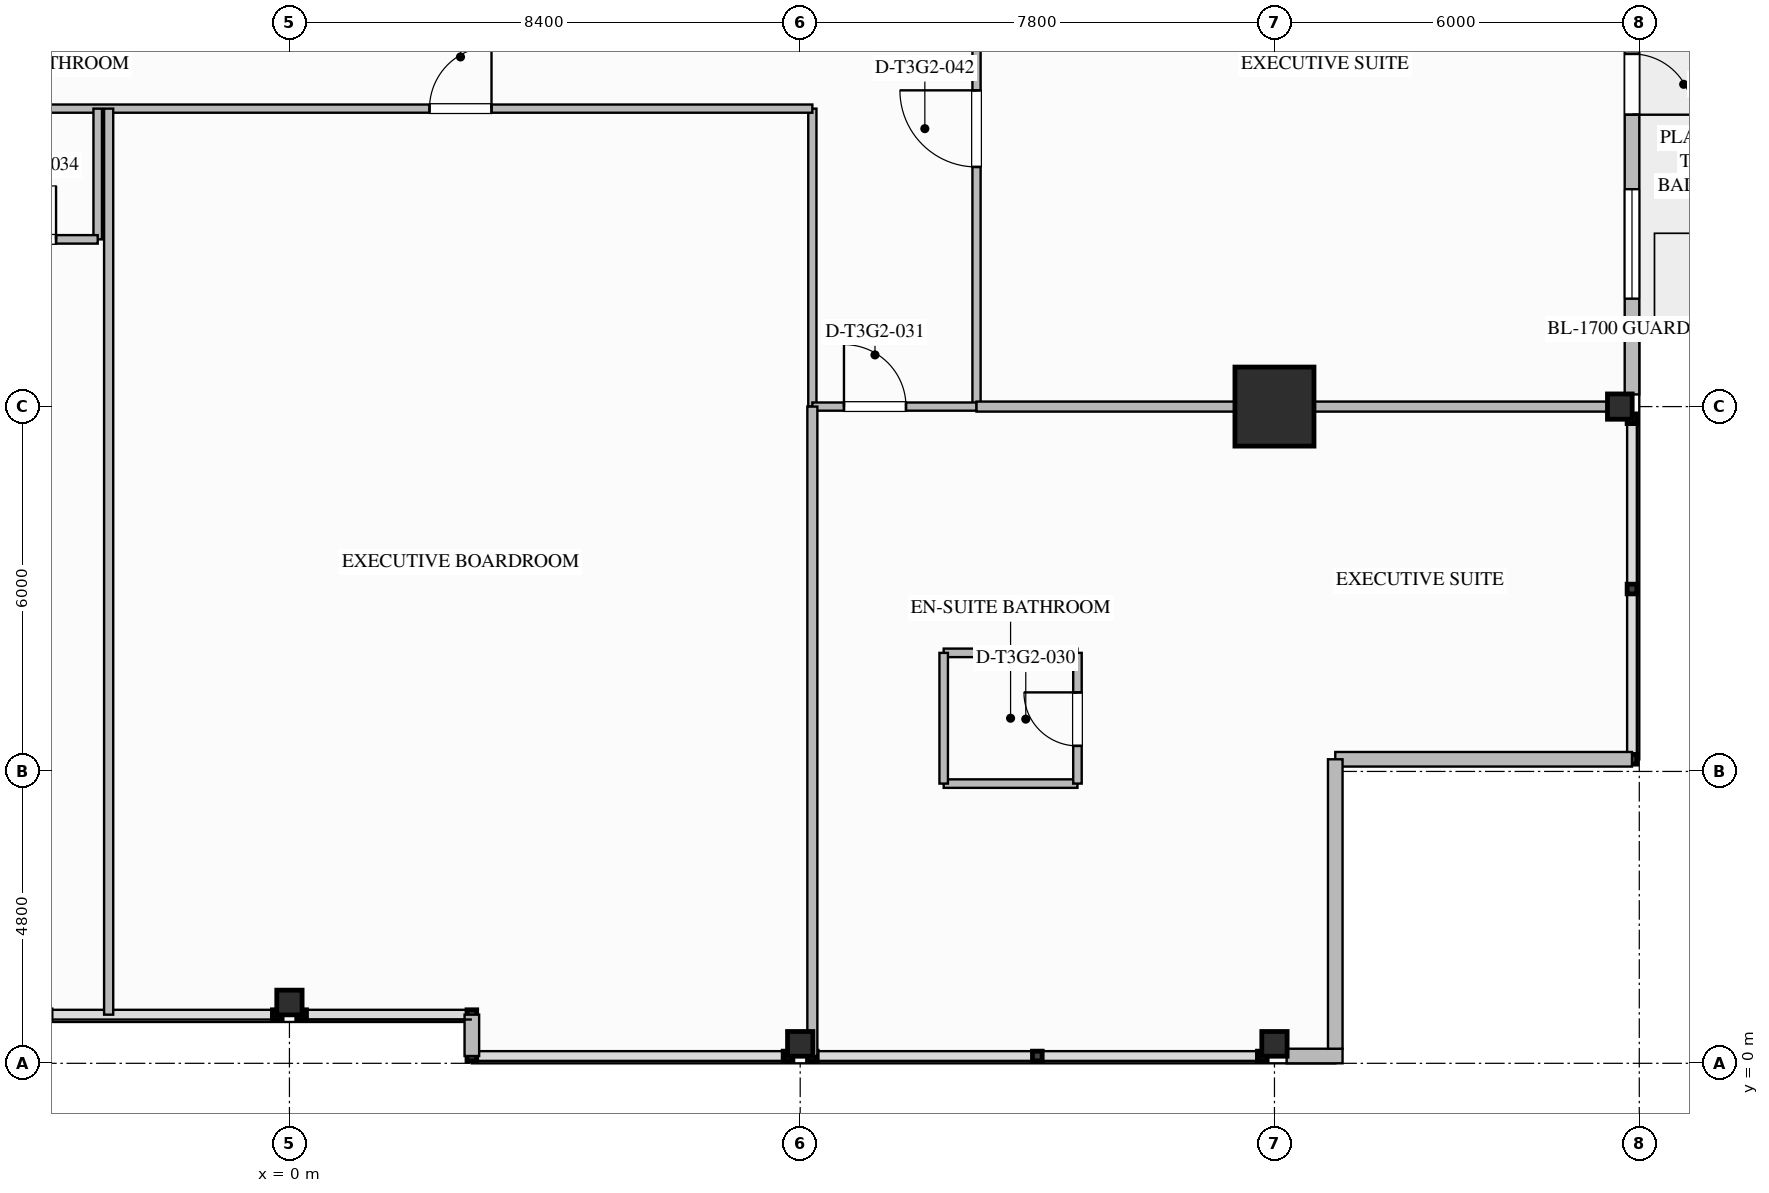
"""IFC4 building model, lengths in metres.
Left out: names, types, materials, properties, quantities, classifications, styles, units other than length and angle.
Written with IfcOpenShell. Run it as: python <this file> out.ifc"""

import sys

from ifc_helpers import new_model, si_unit, direction, frame, frame_2d, origin, origin_2d, place, context, subcontext, project, spatial, rectangle, i_section, extrude, element, fill, save


model = new_model("IFC4")
c1 = context("Model", 3, precision=1e-05, world=origin(), true_north=direction((0.0, 1.0)))
c2 = subcontext(c1, "Body", "Model", "MODEL_VIEW")
j1 = project(units=[si_unit("LENGTHUNIT", "METRE"), si_unit("PLANEANGLEUNIT", "RADIAN")], contexts=[c1])
p1 = place(None, origin())
s1 = spatial("IfcSite", under=j1, at=p1, CompositionType="ELEMENT")
p2 = place(p1, origin())
s2 = spatial("IfcBuilding", under=s1, at=p2, CompositionType="ELEMENT")
p3 = place(p2, frame((0.0, 0.0, 161.05)))
s3 = spatial("IfcBuildingStorey", under=s2, at=p3, CompositionType="ELEMENT", Elevation=161.05)
p4 = place(p3, frame((16.2, 10.8, 0.0), z_axis=(0.0, 0.0, 1.0), x_axis=(1.0, 0.0, 0.0)))
e1 = element("IfcColumn", 1, at=p4, inside=s3, PredefinedType="COLUMN", context=c2, shape_type="SweptSolid", body=[
    extrude(rectangle(XDim=1.3, YDim=1.3, at=origin_2d()), origin(), (0.0, 0.0, 1.0), 3.55),
])
for number, where, z_axis, x_axis in (
    (2, (21.88, 10.8, 0.0), (0.0, 0.0, 1.0), (1.0, 0.0, 0.0)),
    (3, (0.0, 1.0, 0.0), (0.0, 0.0, 1.0), (0.0, 1.0, 0.0)),
    (4, (8.4, 0.32, 0.0), (0.0, 0.0, 1.0), (0.0, 1.0, 0.0)),
    (5, (16.2, 0.32, 0.0), (0.0, 0.0, 1.0), (0.0, 1.0, 0.0)),
):
    element("IfcColumn", number, at=place(p3, frame(where, z_axis=z_axis, x_axis=x_axis)), inside=s3, PredefinedType="COLUMN", context=c2, shape_type="SweptSolid", body=[
        extrude(i_section(OverallWidth=0.406, OverallDepth=0.416, WebThickness=0.03, FlangeThickness=0.048, FilletRadius=0.028, at=origin_2d()), origin(), (0.0, 0.0, 1.0), 3.547),
    ])
p5 = place(p3, frame((22.08, 18.4, 0.0), z_axis=(0.0, 0.0, 1.0), x_axis=(0.0, -1.0, 0.0)))
e6 = element("IfcWall", 6, at=p5, inside=s3, PredefinedType="STANDARD", context=c2, shape_type="SweptSolid", body=[
    extrude(rectangle(XDim=7.4, YDim=0.24, at=frame_2d((3.7, 0.0))), origin(), (0.0, 0.0, 1.0), 2.753),
])
p6 = place(p5, frame((1.8, 0.0, 0.0)))
e7 = element("IfcOpeningElement", 7, at=p6, cuts=e6, PredefinedType="OPENING", context=c2, shape_type="SweptSolid", body=[
    extrude(rectangle(XDim=1.0, YDim=2.2, at=frame_2d((0.5, 1.1))), frame((0.0, 0.13, 0.0), z_axis=(0.0, -1.0, 0.0), x_axis=(1.0, 0.0, 0.0)), (0.0, 0.0, 1.0), 0.26),
])
p7 = place(p5, frame((4.025, 0.0, 0.75)))
e8 = element("IfcOpeningElement", 8, at=p7, cuts=e6, PredefinedType="OPENING", context=c2, shape_type="SweptSolid", body=[
    extrude(rectangle(XDim=1.8, YDim=1.903, at=frame_2d((0.9, 0.952))), frame((0.0, 0.13, 0.0), z_axis=(0.0, -1.0, 0.0), x_axis=(1.0, 0.0, 0.0)), (0.0, 0.0, 1.0), 0.26),
])
p8 = place(p3, frame((17.32, 0.12, 0.0), z_axis=(0.0, 0.0, 1.0), x_axis=(-1.0, 0.0, 0.0)))
e9 = element("IfcWall", 9, at=p8, inside=s3, PredefinedType="STANDARD", context=c2, shape_type="SweptSolid", body=[
    extrude(rectangle(XDim=0.92, YDim=0.24, at=frame_2d((0.46, 0.0))), origin(), (0.0, 0.0, 1.0), 3.29),
])
p9 = place(p3, frame((22.08, 5.0, 0.0), z_axis=(0.0, 0.0, 1.0), x_axis=(-1.0, 0.0, 0.0)))
e10 = element("IfcWall", 10, at=p9, inside=s3, PredefinedType="STANDARD", context=c2, shape_type="SweptSolid", body=[
    extrude(rectangle(XDim=4.88, YDim=0.24, at=frame_2d((2.44, 0.0))), origin(), (0.0, 0.0, 1.0), 3.29),
])
p10 = place(p3, frame((17.2, 5.0, 0.0), z_axis=(0.0, 0.0, 1.0), x_axis=(0.0, -1.0, 0.0)))
e11 = element("IfcWall", 11, at=p10, inside=s3, PredefinedType="STANDARD", context=c2, shape_type="SweptSolid", body=[
    extrude(rectangle(XDim=4.76, YDim=0.24, at=frame_2d((2.38, 0.0))), origin(), (0.0, 0.0, 1.0), 3.29),
])
p11 = place(p3, frame((3.0, 0.12, 0.0), z_axis=(0.0, 0.0, 1.0), x_axis=(0.0, 1.0, 0.0)))
e12 = element("IfcWall", 12, at=p11, inside=s3, PredefinedType="STANDARD", context=c2, shape_type="SweptSolid", body=[
    extrude(rectangle(XDim=0.68, YDim=0.24, at=frame_2d((0.34, 0.0))), origin(), (0.0, 0.0, 1.0), 3.29),
])
p12 = place(p3, frame((8.6, 10.8, 0.0), z_axis=(0.0, 0.0, 1.0), x_axis=(0.0, 1.0, 0.0)))
e13 = element("IfcWall", 13, at=p12, inside=s3, PredefinedType="PARTITIONING", context=c2, shape_type="SweptSolid", body=[
    extrude(rectangle(XDim=4.9, YDim=0.135, at=frame_2d((2.45, 0.0))), origin(), (0.0, 0.0, 1.0), 2.667),
])
p13 = place(p3, frame((-16.2, 15.7, 0.0), z_axis=(0.0, 0.0, 1.0), x_axis=(1.0, 0.0, 0.0)))
e14 = element("IfcWall", 14, at=p13, inside=s3, PredefinedType="PARTITIONING", context=c2, shape_type="SweptSolid", body=[
    extrude(rectangle(XDim=24.8, YDim=0.135, at=frame_2d((12.4, 0.0))), origin(), (0.0, 0.0, 1.0), 3.29),
])
p14 = place(p13, frame((4.768, 0.0, 0.0)))
e15 = element("IfcOpeningElement", 15, at=p14, cuts=e14, PredefinedType="OPENING", context=c2, shape_type="SweptSolid", body=[
    extrude(rectangle(XDim=1.26, YDim=2.2, at=frame_2d((0.63, 1.1))), frame((0.0, 0.077, 0.0), z_axis=(0.0, -1.0, 0.0), x_axis=(1.0, 0.0, 0.0)), (0.0, 0.0, 1.0), 0.155),
])
p15 = place(p13, frame((18.503, 0.0, 0.0)))
e16 = element("IfcOpeningElement", 16, at=p15, cuts=e14, PredefinedType="OPENING", context=c2, shape_type="SweptSolid", body=[
    extrude(rectangle(XDim=1.02, YDim=2.15, at=frame_2d((0.51, 1.075))), frame((0.0, 0.077, 0.0), z_axis=(0.0, -1.0, 0.0), x_axis=(1.0, 0.0, 0.0)), (0.0, 0.0, 1.0), 0.155),
])
p16 = place(p3, frame((11.3, 10.8, 0.0), z_axis=(0.0, 0.0, 1.0), x_axis=(0.0, 1.0, 0.0)))
e17 = element("IfcWall", 17, at=p16, inside=s3, PredefinedType="PARTITIONING", context=c2, shape_type="SweptSolid", body=[
    extrude(rectangle(XDim=32.4, YDim=0.135, at=frame_2d((16.2, 0.0))), origin(), (0.0, 0.0, 1.0), 3.29),
])
p17 = place(p16, frame((3.941, 0.0, 0.0)))
e18 = element("IfcOpeningElement", 18, at=p17, cuts=e17, PredefinedType="OPENING", context=c2, shape_type="SweptSolid", body=[
    extrude(rectangle(XDim=1.26, YDim=2.2, at=frame_2d((0.63, 1.1))), frame((0.0, 0.077, 0.0), z_axis=(0.0, -1.0, 0.0), x_axis=(1.0, 0.0, 0.0)), (0.0, 0.0, 1.0), 0.155),
])
p18 = place(p16, frame((14.355, 0.0, 0.0)))
e19 = element("IfcOpeningElement", 19, at=p18, cuts=e17, PredefinedType="OPENING", context=c2, shape_type="SweptSolid", body=[
    extrude(rectangle(XDim=1.26, YDim=2.2, at=frame_2d((0.63, 1.1))), frame((0.0, 0.077, 0.0), z_axis=(0.0, -1.0, 0.0), x_axis=(1.0, 0.0, 0.0)), (0.0, 0.0, 1.0), 0.155),
])
p19 = place(p16, frame((24.769, 0.0, 0.0)))
e20 = element("IfcOpeningElement", 20, at=p19, cuts=e17, PredefinedType="OPENING", context=c2, shape_type="SweptSolid", body=[
    extrude(rectangle(XDim=1.26, YDim=2.2, at=frame_2d((0.63, 1.1))), frame((0.0, 0.077, 0.0), z_axis=(0.0, -1.0, 0.0), x_axis=(1.0, 0.0, 0.0)), (0.0, 0.0, 1.0), 0.155),
])
p20 = place(p3, frame((8.6, 10.8, 0.0), z_axis=(0.0, 0.0, 1.0), x_axis=(1.0, 0.0, 0.0)))
e21 = element("IfcWall", 21, at=p20, inside=s3, PredefinedType="PARTITIONING", context=c2, shape_type="SweptSolid", body=[
    extrude(rectangle(XDim=2.7, YDim=0.135, at=frame_2d((1.35, 0.0))), origin(), (0.0, 0.0, 1.0), 2.58),
])
p21 = place(p20, frame((0.52, 0.0, 0.0)))
e22 = element("IfcOpeningElement", 22, at=p21, cuts=e21, PredefinedType="OPENING", context=c2, shape_type="SweptSolid", body=[
    extrude(rectangle(XDim=1.02, YDim=2.15, at=frame_2d((0.51, 1.075))), frame((0.0, 0.077, 0.0), z_axis=(0.0, -1.0, 0.0), x_axis=(1.0, 0.0, 0.0)), (0.0, 0.0, 1.0), 0.155),
])
p22 = place(p3, frame((8.6, 0.12, 0.0), z_axis=(0.0, 0.0, 1.0), x_axis=(0.0, 1.0, 0.0)))
e23 = element("IfcWall", 23, at=p22, inside=s3, PredefinedType="PARTITIONING", context=c2, shape_type="SweptSolid", body=[
    extrude(rectangle(XDim=10.68, YDim=0.165, at=frame_2d((5.34, 0.0))), origin(), (0.0, 0.0, 1.0), 2.58),
])
p23 = place(p3, frame((11.3, 10.8, 0.0), z_axis=(0.0, 0.0, 1.0), x_axis=(1.0, 0.0, 0.0)))
e24 = element("IfcWall", 24, at=p23, inside=s3, PredefinedType="PARTITIONING", context=c2, shape_type="SweptSolid", body=[
    extrude(rectangle(XDim=10.78, YDim=0.165, at=frame_2d((5.39, 0.0))), origin(), (0.0, 0.0, 1.0), 2.58),
])
for number, where, z_axis, x_axis in (
    (25, (10.76, 4.6, 0.0), (0.0, 0.0, 1.0), (1.0, 0.0, 0.0)),
    (26, (10.76, 6.75, 0.0), (0.0, 0.0, 1.0), (1.0, 0.0, 0.0)),
):
    element("IfcWall", number, at=place(p3, frame(where, z_axis=z_axis, x_axis=x_axis)), inside=s3, PredefinedType="PLUMBINGWALL", context=c2, shape_type="SweptSolid", body=[
        extrude(rectangle(XDim=2.2, YDim=0.14, at=frame_2d((1.1, 0.0))), origin(), (0.0, 0.0, 1.0), 3.29),
    ])
p24 = place(p3, frame((10.76, 4.6, 0.0), z_axis=(0.0, 0.0, 1.0), x_axis=(0.0, 1.0, 0.0)))
e27 = element("IfcWall", 27, at=p24, inside=s3, PredefinedType="PLUMBINGWALL", context=c2, shape_type="SweptSolid", body=[
    extrude(rectangle(XDim=2.15, YDim=0.14, at=frame_2d((1.075, 0.0))), origin(), (0.0, 0.0, 1.0), 3.29),
])
p25 = place(p3, frame((12.96, 4.6, 0.0), z_axis=(0.0, 0.0, 1.0), x_axis=(0.0, 1.0, 0.0)))
e28 = element("IfcWall", 28, at=p25, inside=s3, PredefinedType="PLUMBINGWALL", context=c2, shape_type="SweptSolid", body=[
    extrude(rectangle(XDim=2.15, YDim=0.14, at=frame_2d((1.075, 0.0))), origin(), (0.0, 0.0, 1.0), 3.29),
])
p26 = place(p25, frame((0.62, 0.0, 0.0)))
e29 = element("IfcOpeningElement", 29, at=p26, cuts=e28, PredefinedType="OPENING", context=c2, shape_type="SweptSolid", body=[
    extrude(rectangle(XDim=0.88, YDim=2.1, at=frame_2d((0.44, 1.05))), frame((0.0, 0.08, 0.0), z_axis=(0.0, -1.0, 0.0), x_axis=(1.0, 0.0, 0.0)), (0.0, 0.0, 1.0), 0.16),
])
p27 = place(p3, frame((-3.153, 15.7, 0.0), z_axis=(0.0, 0.0, 1.0), x_axis=(0.0, -1.0, 0.0)))
e30 = element("IfcWall", 30, at=p27, inside=s3, PredefinedType="PLUMBINGWALL", context=c2, shape_type="SweptSolid", body=[
    extrude(rectangle(XDim=2.15, YDim=0.14, at=frame_2d((1.075, 0.0))), origin(), (0.0, 0.0, 1.0), 3.29),
])
p28 = place(p3, frame((-5.403, 13.55, 0.0), z_axis=(0.0, 0.0, 1.0), x_axis=(1.0, 0.0, 0.0)))
e31 = element("IfcWall", 31, at=p28, inside=s3, PredefinedType="PLUMBINGWALL", context=c2, shape_type="SweptSolid", body=[
    extrude(rectangle(XDim=2.25, YDim=0.14, at=frame_2d((1.125, 0.0))), origin(), (0.0, 0.0, 1.0), 3.29),
])
p29 = place(p28, frame((0.685, 0.0, 0.0)))
e32 = element("IfcOpeningElement", 32, at=p29, cuts=e31, PredefinedType="OPENING", context=c2, shape_type="SweptSolid", body=[
    extrude(rectangle(XDim=0.88, YDim=2.1, at=frame_2d((0.44, 1.05))), frame((0.0, 0.08, 0.0), z_axis=(0.0, -1.0, 0.0), x_axis=(1.0, 0.0, 0.0)), (0.0, 0.0, 1.0), 0.16),
])
p30 = place(p3, frame((-2.973, 0.8, 0.0), z_axis=(0.0, 0.0, 1.0), x_axis=(0.0, 1.0, 0.0)))
e33 = element("IfcWall", 33, at=p30, inside=s3, PredefinedType="PARTITIONING", context=c2, shape_type="SweptSolid", body=[
    extrude(rectangle(XDim=14.9, YDim=0.15, at=frame_2d((7.45, 0.0))), origin(), (0.0, 0.0, 1.0), 3.29),
])
p31 = place(p6, origin())
e34 = element("IfcDoor", 34, at=p31, inside=s3, OperationType="SINGLE_SWING_RIGHT", PredefinedType="DOOR", context=c2, shape_type="SweptSolid", body=[
    extrude(rectangle(XDim=1.0, YDim=2.2, at=frame_2d((0.5, 1.1))), frame((0.0, 0.025, 0.0), z_axis=(0.0, -1.0, 0.0), x_axis=(1.0, 0.0, 0.0)), (0.0, 0.0, 1.0), 0.05),
])
fill(e7, e34)
p32 = place(p7, origin())
e35 = element("IfcWindow", 35, at=p32, inside=s3, PartitioningType="SINGLE_PANEL", PredefinedType="WINDOW", context=c2, shape_type="SweptSolid", body=[
    extrude(rectangle(XDim=1.8, YDim=1.903, at=frame_2d((0.9, 0.952))), frame((0.0, 0.03, 0.0), z_axis=(0.0, -1.0, 0.0), x_axis=(1.0, 0.0, 0.0)), (0.0, 0.0, 1.0), 0.06),
])
fill(e8, e35)
p33 = place(p26, origin())
e36 = element("IfcDoor", 36, at=p33, inside=s3, OperationType="SINGLE_SWING_RIGHT", PredefinedType="DOOR", context=c2, shape_type="SweptSolid", body=[
    extrude(rectangle(XDim=0.88, YDim=2.1, at=frame_2d((0.44, 1.05))), frame((0.0, 0.025, 0.0), z_axis=(0.0, -1.0, 0.0), x_axis=(1.0, 0.0, 0.0)), (0.0, 0.0, 1.0), 0.05),
])
fill(e29, e36)
p34 = place(p21, origin())
e37 = element("IfcDoor", 37, at=p34, inside=s3, OperationType="SINGLE_SWING_LEFT", PredefinedType="DOOR", context=c2, shape_type="SweptSolid", body=[
    extrude(rectangle(XDim=1.02, YDim=2.15, at=frame_2d((0.51, 1.075))), frame((0.0, 0.025, 0.0), z_axis=(0.0, -1.0, 0.0), x_axis=(1.0, 0.0, 0.0)), (0.0, 0.0, 1.0), 0.05),
])
fill(e22, e37)
p35 = place(p29, origin())
e38 = element("IfcDoor", 38, at=p35, inside=s3, OperationType="SINGLE_SWING_RIGHT", PredefinedType="DOOR", context=c2, shape_type="SweptSolid", body=[
    extrude(rectangle(XDim=0.88, YDim=2.1, at=frame_2d((0.44, 1.05))), frame((0.0, 0.025, 0.0), z_axis=(0.0, -1.0, 0.0), x_axis=(1.0, 0.0, 0.0)), (0.0, 0.0, 1.0), 0.05),
])
fill(e32, e38)
p36 = place(p15, origin())
e39 = element("IfcDoor", 39, at=p36, inside=s3, OperationType="SINGLE_SWING_RIGHT", PredefinedType="DOOR", context=c2, shape_type="SweptSolid", body=[
    extrude(rectangle(XDim=1.02, YDim=2.15, at=frame_2d((0.51, 1.075))), frame((0.0, 0.025, 0.0), z_axis=(0.0, -1.0, 0.0), x_axis=(1.0, 0.0, 0.0)), (0.0, 0.0, 1.0), 0.05),
])
fill(e16, e39)
p37 = place(p17, origin())
e40 = element("IfcDoor", 40, at=p37, inside=s3, OperationType="SINGLE_SWING_RIGHT", PredefinedType="DOOR", context=c2, shape_type="SweptSolid", body=[
    extrude(rectangle(XDim=1.26, YDim=2.2, at=frame_2d((0.63, 1.1))), frame((0.0, 0.025, 0.0), z_axis=(0.0, -1.0, 0.0), x_axis=(1.0, 0.0, 0.0)), (0.0, 0.0, 1.0), 0.05),
])
fill(e18, e40)
save(model, sys.argv[1])
